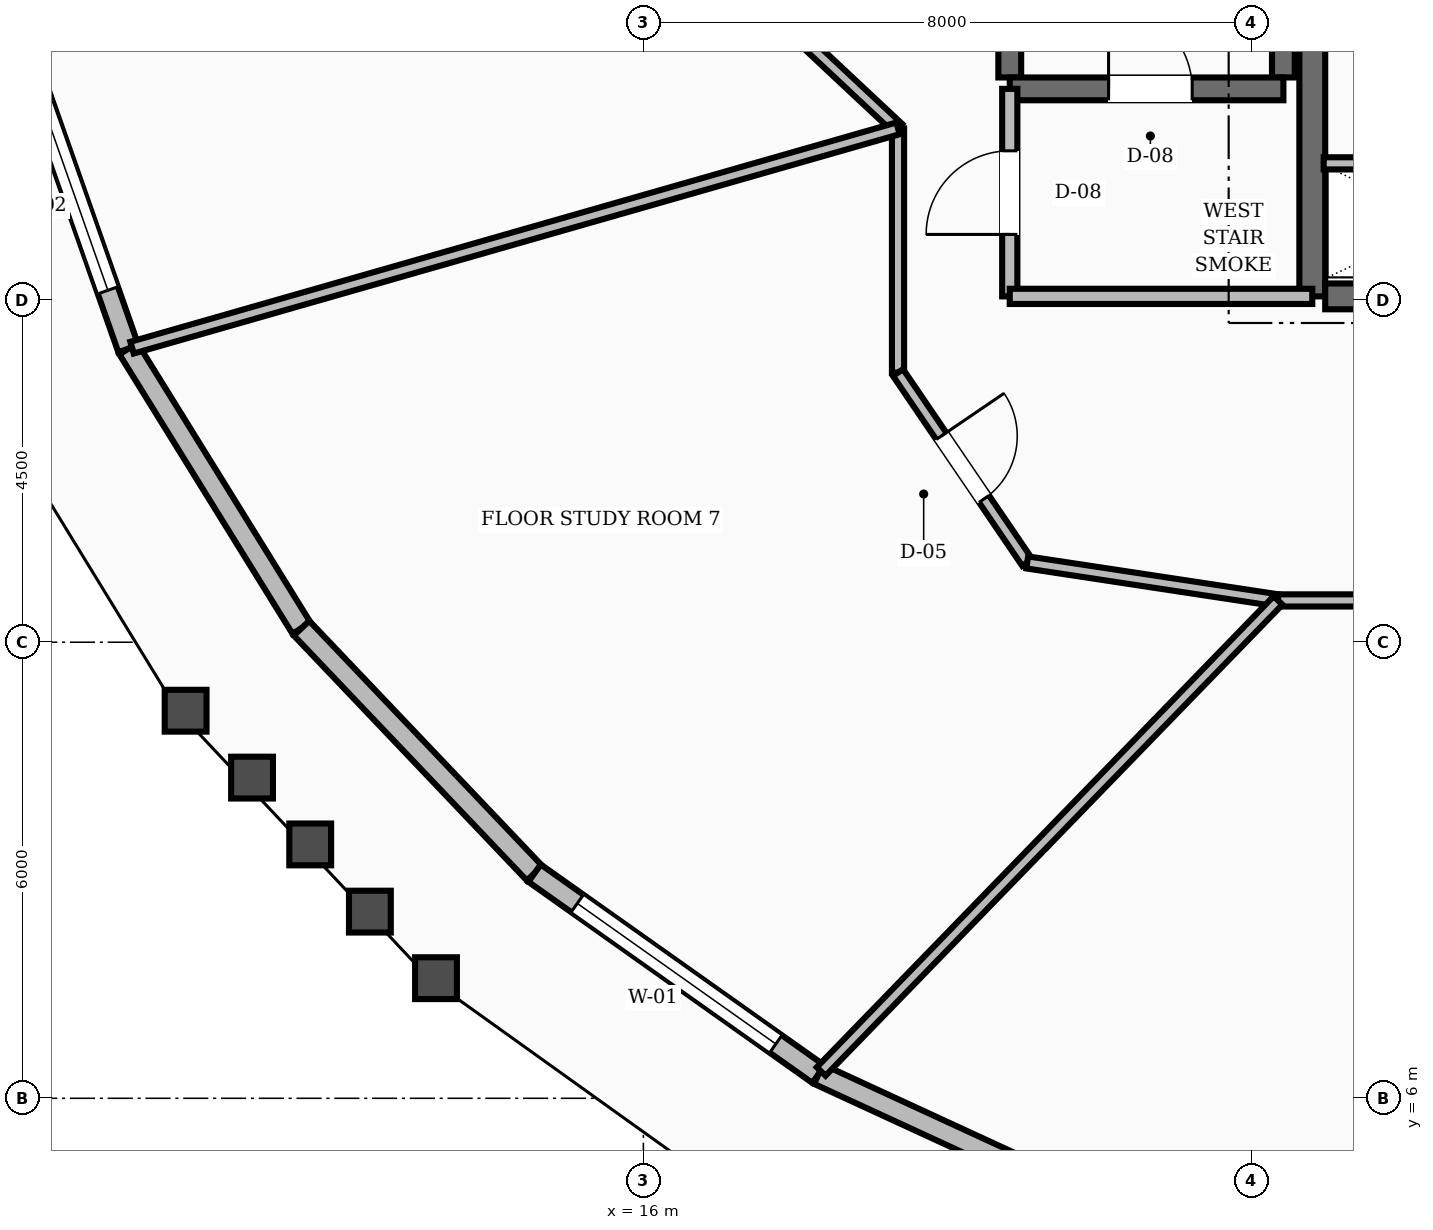
"""IFC4 building model, lengths in metres.
Left out: names, types, materials, properties, quantities, classifications, styles, units other than length and angle.
Written with IfcOpenShell. Run it as: python <this file> out.ifc"""

import sys

from ifc_helpers import new_model, si_unit, direction, frame, frame_2d, origin, place, context, subcontext, project, spatial, rectangle, extrude, element, fill, save


model = new_model("IFC4")
c1 = context("Model", 3, precision=1e-05, world=origin(), true_north=direction((0.0, 1.0)))
c2 = subcontext(c1, "Body", "Model", "MODEL_VIEW")
j1 = project(units=[si_unit("LENGTHUNIT", "METRE"), si_unit("PLANEANGLEUNIT", "RADIAN")], contexts=[c1])
p1 = place(None, origin())
s1 = spatial("IfcSite", under=j1, at=p1, CompositionType="ELEMENT")
p2 = place(p1, origin())
s2 = spatial("IfcBuilding", under=s1, at=p2, CompositionType="ELEMENT")
p3 = place(p2, frame((0.0, 0.0, 196.4)))
s3 = spatial("IfcBuildingStorey", under=s2, at=p3, CompositionType="ELEMENT", Elevation=196.4)
p4 = place(p3, frame((24.8, 16.55, 0.0), z_axis=(0.0, 0.0, 1.0), x_axis=(0.0, 1.0, 0.0)))
e1 = element("IfcWall", 1, at=p4, inside=s3, PredefinedType="SHEAR", context=c2, shape_type="SweptSolid", body=[
    extrude(rectangle(XDim=6.3, YDim=0.34, at=frame_2d((3.15, 0.0))), origin(), (0.0, 0.0, 1.0), 3.6),
])
p5 = place(p3, frame((24.97, 16.55, 0.0), z_axis=(0.0, 0.0, 1.0), x_axis=(1.0, 0.0, 0.0)))
e2 = element("IfcWall", 2, at=p5, inside=s3, PredefinedType="SHEAR", context=c2, shape_type="SweptSolid", body=[
    extrude(rectangle(XDim=3.23, YDim=0.34, at=frame_2d((1.615, 0.0))), origin(), (0.0, 0.0, 1.0), 3.6),
])
for number, where, z_axis, x_axis in (
    (3, (20.82, 19.43, 0.0), (0.0, 0.0, 1.0), (0.0, 1.0, 0.0)),
    (4, (24.42, 19.43, 0.0), (0.0, 0.0, 1.0), (0.0, 1.0, 0.0)),
):
    element("IfcWall", number, at=place(p3, frame(where, z_axis=z_axis, x_axis=x_axis)), inside=s3, PredefinedType="SHEAR", context=c2, shape_type="SweptSolid", body=[
        extrude(rectangle(XDim=8.74, YDim=0.3, at=frame_2d((4.37, 0.0))), origin(), (0.0, 0.0, 1.0), 3.6),
    ])
p6 = place(p3, frame((20.82, 19.28, 0.0), z_axis=(0.0, 0.0, 1.0), x_axis=(1.0, 0.0, 0.0)))
e5 = element("IfcWall", 5, at=p6, inside=s3, PredefinedType="SHEAR", context=c2, shape_type="SweptSolid", body=[
    extrude(rectangle(XDim=3.6, YDim=0.3, at=frame_2d((1.8, 0.0))), origin(), (0.0, 0.0, 1.0), 3.6),
])
p7 = place(p6, frame((1.3, 0.0, 0.0)))
e6 = element("IfcOpeningElement", 6, at=p7, cuts=e5, PredefinedType="OPENING", context=c2, shape_type="SweptSolid", body=[
    extrude(rectangle(XDim=1.1, YDim=2.1, at=frame_2d((0.55, 1.05))), frame((0.0, 0.16, 0.0), z_axis=(0.0, -1.0, 0.0), x_axis=(1.0, 0.0, 0.0)), (0.0, 0.0, 1.0), 0.32),
])
p8 = place(p3, frame((7.822, 19.851, 0.0), z_axis=(0.0, 0.0, 1.0), x_axis=(0.331702633575, -0.943383995454, 0.0)))
e7 = element("IfcWall", 7, at=p8, inside=s3, PredefinedType="STANDARD", context=c2, shape_type="SweptSolid", body=[
    extrude(rectangle(XDim=4.229, YDim=0.28, at=frame_2d((2.115, 0.0))), origin(), (0.0, 0.0, 1.0), 2.82),
])
p9 = place(p8, frame((0.814, 0.0, 0.8)))
e8 = element("IfcOpeningElement", 8, at=p9, cuts=e7, PredefinedType="OPENING", context=c2, shape_type="SweptSolid", body=[
    extrude(rectangle(XDim=2.6, YDim=1.65, at=frame_2d((1.3, 0.825))), frame((0.0, 0.15, 0.0), z_axis=(0.0, -1.0, 0.0), x_axis=(1.0, 0.0, 0.0)), (0.0, 0.0, 1.0), 0.3),
])
p10 = place(p3, frame((9.225, 15.861, 0.0), z_axis=(0.0, 0.0, 1.0), x_axis=(0.526686858754, -0.850059381935, 0.0)))
e9 = element("IfcWall", 9, at=p10, inside=s3, PredefinedType="STANDARD", context=c2, shape_type="SweptSolid", body=[
    extrude(rectangle(XDim=4.325, YDim=0.28, at=frame_2d((2.163, 0.0))), origin(), (0.0, 0.0, 1.0), 2.82),
])
p11 = place(p3, frame((11.503, 12.185, 0.0), z_axis=(0.0, 0.0, 1.0), x_axis=(0.689241173538, -0.724531990115, 0.0)))
e10 = element("IfcWall", 10, at=p11, inside=s3, PredefinedType="STANDARD", context=c2, shape_type="SweptSolid", body=[
    extrude(rectangle(XDim=4.448, YDim=0.28, at=frame_2d((2.224, 0.0))), origin(), (0.0, 0.0, 1.0), 2.82),
])
p12 = place(p3, frame((14.569, 8.962, 0.0), z_axis=(0.0, 0.0, 1.0), x_axis=(0.81615549773, -0.577832331672, 0.0)))
e11 = element("IfcWall", 11, at=p12, inside=s3, PredefinedType="STANDARD", context=c2, shape_type="SweptSolid", body=[
    extrude(rectangle(XDim=4.577, YDim=0.28, at=frame_2d((2.289, 0.0))), origin(), (0.0, 0.0, 1.0), 2.82),
])
p13 = place(p12, frame((0.688, 0.0, 0.8)))
e12 = element("IfcOpeningElement", 12, at=p13, cuts=e11, PredefinedType="OPENING", context=c2, shape_type="SweptSolid", body=[
    extrude(rectangle(XDim=3.2, YDim=1.65, at=frame_2d((1.6, 0.825))), frame((0.0, 0.15, 0.0), z_axis=(0.0, -1.0, 0.0), x_axis=(1.0, 0.0, 0.0)), (0.0, 0.0, 1.0), 0.3),
])
p14 = place(p3, frame((18.304, 6.317, 0.0), z_axis=(0.0, 0.0, 1.0), x_axis=(0.908099405027, -0.41875466635, 0.0)))
e13 = element("IfcWall", 13, at=p14, inside=s3, PredefinedType="STANDARD", context=c2, shape_type="SweptSolid", body=[
    extrude(rectangle(XDim=4.693, YDim=0.28, at=frame_2d((2.347, 0.0))), origin(), (0.0, 0.0, 1.0), 2.82),
])
p15 = place(p3, frame((20.82, 16.55, 0.0), z_axis=(0.0, 0.0, 1.0), x_axis=(0.0, 1.0, 0.0)))
e14 = element("IfcWall", 14, at=p15, inside=s3, PredefinedType="SOLIDWALL", context=c2, shape_type="SweptSolid", body=[
    extrude(rectangle(XDim=2.73, YDim=0.2, at=frame_2d((1.365, 0.0))), origin(), (0.0, 0.0, 1.0), 2.8),
])
p16 = place(p15, frame((0.815, 0.0, 0.0)))
e15 = element("IfcOpeningElement", 15, at=p16, cuts=e14, PredefinedType="OPENING", context=c2, shape_type="SweptSolid", body=[
    extrude(rectangle(XDim=1.1, YDim=2.1, at=frame_2d((0.55, 1.05))), frame((0.0, 0.11, 0.0), z_axis=(0.0, -1.0, 0.0), x_axis=(1.0, 0.0, 0.0)), (0.0, 0.0, 1.0), 0.22),
])
p17 = place(p3, frame((20.82, 16.55, 0.0), z_axis=(0.0, 0.0, 1.0), x_axis=(1.0, 0.0, 0.0)))
e16 = element("IfcWall", 16, at=p17, inside=s3, PredefinedType="SOLIDWALL", context=c2, shape_type="SweptSolid", body=[
    extrude(rectangle(XDim=3.98, YDim=0.2, at=frame_2d((1.99, 0.0))), origin(), (0.0, 0.0, 1.0), 2.8),
])
p18 = place(p3, frame((24.95, 18.3, 0.0), z_axis=(0.0, 0.0, 1.0), x_axis=(1.0, 0.0, 0.0)))
e17 = element("IfcWall", 17, at=p18, inside=s3, PredefinedType="SOLIDWALL", context=c2, shape_type="SweptSolid", body=[
    extrude(rectangle(XDim=3.2, YDim=0.16, at=frame_2d((1.6, 0.0))), origin(), (0.0, 0.0, 1.0), 2.8),
])
p19 = place(p3, frame((16.95, 21.006, 0.0), z_axis=(0.0, 0.0, 1.0), x_axis=(0.730150682073, -0.683286163674, 0.0)))
e18 = element("IfcWall", 18, at=p19, inside=s3, PredefinedType="SOLIDWALL", context=c2, shape_type="SweptSolid", body=[
    extrude(rectangle(XDim=3.287, YDim=0.16, at=frame_2d((1.644, 0.0))), origin(), (0.0, 0.0, 1.0), 2.8),
])
p20 = place(p3, frame((19.35, 18.76, 0.0), z_axis=(0.0, 0.0, 1.0), x_axis=(0.0, -1.0, 0.0)))
e19 = element("IfcWall", 19, at=p20, inside=s3, PredefinedType="SOLIDWALL", context=c2, shape_type="SweptSolid", body=[
    extrude(rectangle(XDim=3.213, YDim=0.16, at=frame_2d((1.606, 0.0))), origin(), (0.0, 0.0, 1.0), 2.8),
])
p21 = place(p3, frame((19.35, 15.548, 0.0), z_axis=(0.0, 0.0, 1.0), x_axis=(0.562674669208, -0.826678423955, 0.0)))
e20 = element("IfcWall", 20, at=p21, inside=s3, PredefinedType="SOLIDWALL", context=c2, shape_type="SweptSolid", body=[
    extrude(rectangle(XDim=3.021, YDim=0.16, at=frame_2d((1.511, 0.0))), origin(), (0.0, 0.0, 1.0), 2.8),
])
p22 = place(p21, frame((1.01, 0.0, 0.0)))
e21 = element("IfcOpeningElement", 21, at=p22, cuts=e20, PredefinedType="OPENING", context=c2, shape_type="SweptSolid", body=[
    extrude(rectangle(XDim=1.0, YDim=2.1, at=frame_2d((0.5, 1.05))), frame((0.0, 0.09, 0.0), z_axis=(0.0, -1.0, 0.0), x_axis=(1.0, 0.0, 0.0)), (0.0, 0.0, 1.0), 0.18),
])
p23 = place(p3, frame((21.05, 13.05, 0.0), z_axis=(0.0, 0.0, 1.0), x_axis=(0.988710906508, -0.149835721217, 0.0)))
e22 = element("IfcWall", 22, at=p23, inside=s3, PredefinedType="SOLIDWALL", context=c2, shape_type="SweptSolid", body=[
    extrude(rectangle(XDim=3.337, YDim=0.16, at=frame_2d((1.668, 0.0))), origin(), (0.0, 0.0, 1.0), 2.8),
])
p24 = place(p3, frame((24.349, 12.55, 0.0), z_axis=(0.0, 0.0, 1.0), x_axis=(1.0, 0.0, 0.0)))
e23 = element("IfcWall", 23, at=p24, inside=s3, PredefinedType="SOLIDWALL", context=c2, shape_type="SweptSolid", body=[
    extrude(rectangle(XDim=2.908, YDim=0.16, at=frame_2d((1.454, 0.0))), origin(), (0.0, 0.0, 1.0), 2.8),
])
p25 = place(p3, frame((19.35, 18.76, 0.0), z_axis=(0.0, 0.0, 1.0), x_axis=(-0.961378794816, -0.275228655628, 0.0)))
e24 = element("IfcWall", 24, at=p25, inside=s3, PredefinedType="SOLIDWALL", context=c2, shape_type="SweptSolid", body=[
    extrude(rectangle(XDim=10.482, YDim=0.16, at=frame_2d((5.241, 0.0))), origin(), (0.0, 0.0, 1.0), 2.8),
])
p26 = place(p3, frame((24.349, 12.55, 0.0), z_axis=(0.0, 0.0, 1.0), x_axis=(-0.69620722349, -0.717840861167, 0.0)))
e25 = element("IfcWall", 25, at=p26, inside=s3, PredefinedType="SOLIDWALL", context=c2, shape_type="SweptSolid", body=[
    extrude(rectangle(XDim=8.633, YDim=0.16, at=frame_2d((4.317, 0.0))), origin(), (0.0, 0.0, 1.0), 2.8),
])
p27 = place(p9, origin())
e26 = element("IfcWindow", 26, at=p27, inside=s3, PartitioningType="SINGLE_PANEL", PredefinedType="WINDOW", context=c2, shape_type="SweptSolid", body=[
    extrude(rectangle(XDim=2.6, YDim=1.65, at=frame_2d((1.3, 0.825))), frame((0.0, 0.03, 0.0), z_axis=(0.0, -1.0, 0.0), x_axis=(1.0, 0.0, 0.0)), (0.0, 0.0, 1.0), 0.06),
])
fill(e8, e26)
p28 = place(p13, origin())
e27 = element("IfcWindow", 27, at=p28, inside=s3, PartitioningType="SINGLE_PANEL", PredefinedType="WINDOW", context=c2, shape_type="SweptSolid", body=[
    extrude(rectangle(XDim=3.2, YDim=1.65, at=frame_2d((1.6, 0.825))), frame((0.0, 0.03, 0.0), z_axis=(0.0, -1.0, 0.0), x_axis=(1.0, 0.0, 0.0)), (0.0, 0.0, 1.0), 0.06),
])
fill(e12, e27)
p29 = place(p7, origin())
e28 = element("IfcDoor", 28, at=p29, inside=s3, OperationType="SINGLE_SWING_LEFT", PredefinedType="DOOR", context=c2, shape_type="SweptSolid", body=[
    extrude(rectangle(XDim=1.1, YDim=2.1, at=frame_2d((0.55, 1.05))), frame((0.0, 0.025, 0.0), z_axis=(0.0, -1.0, 0.0), x_axis=(1.0, 0.0, 0.0)), (0.0, 0.0, 1.0), 0.05),
])
fill(e6, e28)
p30 = place(p16, origin())
e29 = element("IfcDoor", 29, at=p30, inside=s3, OperationType="SINGLE_SWING_LEFT", PredefinedType="DOOR", context=c2, shape_type="SweptSolid", body=[
    extrude(rectangle(XDim=1.1, YDim=2.1, at=frame_2d((0.55, 1.05))), frame((0.0, 0.025, 0.0), z_axis=(0.0, -1.0, 0.0), x_axis=(1.0, 0.0, 0.0)), (0.0, 0.0, 1.0), 0.05),
])
fill(e15, e29)
p31 = place(p22, origin())
e30 = element("IfcDoor", 30, at=p31, inside=s3, OperationType="SINGLE_SWING_LEFT", PredefinedType="DOOR", context=c2, shape_type="SweptSolid", body=[
    extrude(rectangle(XDim=1.0, YDim=2.1, at=frame_2d((0.5, 1.05))), frame((0.0, 0.025, 0.0), z_axis=(0.0, -1.0, 0.0), x_axis=(1.0, 0.0, 0.0)), (0.0, 0.0, 1.0), 0.05),
])
fill(e21, e30)
save(model, sys.argv[1])
